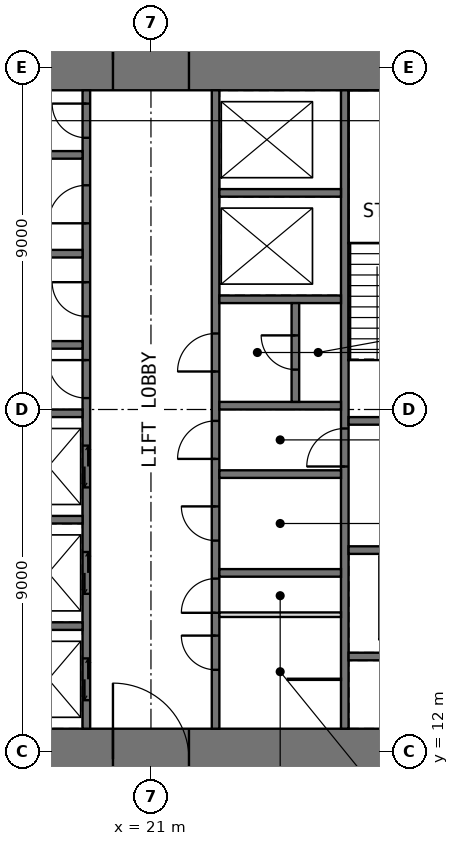
"""IFC4 building model, lengths in metres.
Left out: names, types, materials, properties, quantities, classifications, styles, units other than length and angle.
Written with IfcOpenShell. Run it as: python <this file> out.ifc"""

import sys

from ifc_helpers import new_model, si_unit, direction, frame, frame_2d, origin, place, context, subcontext, project, spatial, rectangle, extrude, element, fill, save


model = new_model("IFC4")
c1 = context("Model", 3, precision=1e-05, world=origin(), true_north=direction((0.0, 1.0)))
c2 = subcontext(c1, "Body", "Model", "MODEL_VIEW")
j1 = project(units=[si_unit("LENGTHUNIT", "METRE"), si_unit("PLANEANGLEUNIT", "RADIAN")], contexts=[c1])
p1 = place(None, origin())
s1 = spatial("IfcSite", under=j1, at=p1, CompositionType="ELEMENT")
p2 = place(p1, origin())
s2 = spatial("IfcBuilding", under=s1, at=p2, CompositionType="ELEMENT")
p3 = place(p2, frame((0.0, 0.0, 144.5)))
s3 = spatial("IfcBuildingStorey", under=s2, at=p3, CompositionType="ELEMENT", Elevation=144.5)
p4 = place(p3, frame((11.0, 11.8, -0.05), z_axis=(0.0, 0.0, 1.0), x_axis=(1.0, 0.0, 0.0)))
e1 = element("IfcWall", 1, at=p4, inside=s3, PredefinedType="SHEAR", context=c2, shape_type="SweptSolid", body=[
    extrude(rectangle(XDim=20.0, YDim=1.6, at=frame_2d((10.0, 0.0))), origin(), (0.0, 0.0, 1.0), 4.0),
])
p5 = place(p4, frame((9.0, 0.0, 0.05)))
e2 = element("IfcOpeningElement", 2, at=p5, cuts=e1, PredefinedType="OPENING", context=c2, shape_type="SweptSolid", body=[
    extrude(rectangle(XDim=2.0, YDim=2.2, at=frame_2d((1.0, 1.1))), frame((0.0, 0.81, 0.0), z_axis=(0.0, -1.0, 0.0), x_axis=(1.0, 0.0, 0.0)), (0.0, 0.0, 1.0), 1.62),
])
p6 = place(p3, frame((11.0, 30.2, -0.05), z_axis=(0.0, 0.0, 1.0), x_axis=(1.0, 0.0, 0.0)))
e3 = element("IfcWall", 3, at=p6, inside=s3, PredefinedType="SHEAR", context=c2, shape_type="SweptSolid", body=[
    extrude(rectangle(XDim=20.0, YDim=1.6, at=frame_2d((10.0, 0.0))), origin(), (0.0, 0.0, 1.0), 4.0),
])
p7 = place(p6, frame((9.0, 0.0, 0.05)))
e4 = element("IfcOpeningElement", 4, at=p7, cuts=e3, PredefinedType="OPENING", context=c2, shape_type="SweptSolid", body=[
    extrude(rectangle(XDim=2.0, YDim=2.2, at=frame_2d((1.0, 1.1))), frame((0.0, 0.81, 0.0), z_axis=(0.0, -1.0, 0.0), x_axis=(1.0, 0.0, 0.0)), (0.0, 0.0, 1.0), 1.62),
])
p8 = place(p3, frame((19.3, 12.6, -0.05), z_axis=(0.0, 0.0, 1.0), x_axis=(0.0, 1.0, 0.0)))
e5 = element("IfcWall", 5, at=p8, inside=s3, PredefinedType="SHEAR", context=c2, shape_type="SweptSolid", body=[
    extrude(rectangle(XDim=16.8, YDim=0.2, at=frame_2d((8.4, 0.0))), origin(), (0.0, 0.0, 1.0), 4.0),
])
p9 = place(p8, frame((8.7, 0.0, 0.05)))
e6 = element("IfcOpeningElement", 6, at=p9, cuts=e5, PredefinedType="OPENING", context=c2, shape_type="SweptSolid", body=[
    extrude(rectangle(XDim=1.0, YDim=2.2, at=frame_2d((0.5, 1.1))), frame((0.0, 0.11, 0.0), z_axis=(0.0, -1.0, 0.0), x_axis=(1.0, 0.0, 0.0)), (0.0, 0.0, 1.0), 0.22),
])
p10 = place(p8, frame((10.85, 0.0, 0.05)))
e7 = element("IfcOpeningElement", 7, at=p10, cuts=e5, PredefinedType="OPENING", context=c2, shape_type="SweptSolid", body=[
    extrude(rectangle(XDim=0.9, YDim=2.2, at=frame_2d((0.45, 1.1))), frame((0.0, 0.11, 0.0), z_axis=(0.0, -1.0, 0.0), x_axis=(1.0, 0.0, 0.0)), (0.0, 0.0, 1.0), 0.22),
])
p11 = place(p8, frame((13.3, 0.0, 0.05)))
e8 = element("IfcOpeningElement", 8, at=p11, cuts=e5, PredefinedType="OPENING", context=c2, shape_type="SweptSolid", body=[
    extrude(rectangle(XDim=1.0, YDim=2.2, at=frame_2d((0.5, 1.1))), frame((0.0, 0.11, 0.0), z_axis=(0.0, -1.0, 0.0), x_axis=(1.0, 0.0, 0.0)), (0.0, 0.0, 1.0), 0.22),
])
p12 = place(p8, frame((15.55, 0.0, 0.05)))
e9 = element("IfcOpeningElement", 9, at=p12, cuts=e5, PredefinedType="OPENING", context=c2, shape_type="SweptSolid", body=[
    extrude(rectangle(XDim=0.9, YDim=2.2, at=frame_2d((0.45, 1.1))), frame((0.0, 0.11, 0.0), z_axis=(0.0, -1.0, 0.0), x_axis=(1.0, 0.0, 0.0)), (0.0, 0.0, 1.0), 0.22),
])
p13 = place(p8, frame((0.75, 0.0, 0.05)))
e10 = element("IfcOpeningElement", 10, at=p13, cuts=e5, PredefinedType="OPENING", context=c2, shape_type="SweptSolid", body=[
    extrude(rectangle(XDim=1.1, YDim=2.2, at=frame_2d((0.55, 1.1))), frame((0.0, 0.11, 0.0), z_axis=(0.0, -1.0, 0.0), x_axis=(1.0, 0.0, 0.0)), (0.0, 0.0, 1.0), 0.22),
])
p14 = place(p8, frame((3.55, 0.0, 0.05)))
e11 = element("IfcOpeningElement", 11, at=p14, cuts=e5, PredefinedType="OPENING", context=c2, shape_type="SweptSolid", body=[
    extrude(rectangle(XDim=1.1, YDim=2.2, at=frame_2d((0.55, 1.1))), frame((0.0, 0.11, 0.0), z_axis=(0.0, -1.0, 0.0), x_axis=(1.0, 0.0, 0.0)), (0.0, 0.0, 1.0), 0.22),
])
p15 = place(p8, frame((6.35, 0.0, 0.05)))
e12 = element("IfcOpeningElement", 12, at=p15, cuts=e5, PredefinedType="OPENING", context=c2, shape_type="SweptSolid", body=[
    extrude(rectangle(XDim=1.1, YDim=2.2, at=frame_2d((0.55, 1.1))), frame((0.0, 0.11, 0.0), z_axis=(0.0, -1.0, 0.0), x_axis=(1.0, 0.0, 0.0)), (0.0, 0.0, 1.0), 0.22),
])
p16 = place(p3, frame((22.7, 12.6, -0.05), z_axis=(0.0, 0.0, 1.0), x_axis=(0.0, 1.0, 0.0)))
e13 = element("IfcWall", 13, at=p16, inside=s3, PredefinedType="SHEAR", context=c2, shape_type="SweptSolid", body=[
    extrude(rectangle(XDim=16.8, YDim=0.2, at=frame_2d((8.4, 0.0))), origin(), (0.0, 0.0, 1.0), 4.0),
])
p17 = place(p16, frame((3.05, 0.0, 0.05)))
e14 = element("IfcOpeningElement", 14, at=p17, cuts=e13, PredefinedType="OPENING", context=c2, shape_type="SweptSolid", body=[
    extrude(rectangle(XDim=0.9, YDim=2.2, at=frame_2d((0.45, 1.1))), frame((0.0, 0.11, 0.0), z_axis=(0.0, -1.0, 0.0), x_axis=(1.0, 0.0, 0.0)), (0.0, 0.0, 1.0), 0.22),
])
p18 = place(p16, frame((7.1, 0.0, 0.05)))
e15 = element("IfcOpeningElement", 15, at=p18, cuts=e13, PredefinedType="OPENING", context=c2, shape_type="SweptSolid", body=[
    extrude(rectangle(XDim=1.0, YDim=2.2, at=frame_2d((0.5, 1.1))), frame((0.0, 0.11, 0.0), z_axis=(0.0, -1.0, 0.0), x_axis=(1.0, 0.0, 0.0)), (0.0, 0.0, 1.0), 0.22),
])
p19 = place(p16, frame((1.55, 0.0, 0.05)))
e16 = element("IfcOpeningElement", 16, at=p19, cuts=e13, PredefinedType="OPENING", context=c2, shape_type="SweptSolid", body=[
    extrude(rectangle(XDim=0.9, YDim=2.2, at=frame_2d((0.45, 1.1))), frame((0.0, 0.11, 0.0), z_axis=(0.0, -1.0, 0.0), x_axis=(1.0, 0.0, 0.0)), (0.0, 0.0, 1.0), 0.22),
])
p20 = place(p16, frame((4.95, 0.0, 0.05)))
e17 = element("IfcOpeningElement", 17, at=p20, cuts=e13, PredefinedType="OPENING", context=c2, shape_type="SweptSolid", body=[
    extrude(rectangle(XDim=0.9, YDim=2.2, at=frame_2d((0.45, 1.1))), frame((0.0, 0.11, 0.0), z_axis=(0.0, -1.0, 0.0), x_axis=(1.0, 0.0, 0.0)), (0.0, 0.0, 1.0), 0.22),
])
p21 = place(p16, frame((9.4, 0.0, 0.05)))
e18 = element("IfcOpeningElement", 18, at=p21, cuts=e13, PredefinedType="OPENING", context=c2, shape_type="SweptSolid", body=[
    extrude(rectangle(XDim=1.0, YDim=2.2, at=frame_2d((0.5, 1.1))), frame((0.0, 0.11, 0.0), z_axis=(0.0, -1.0, 0.0), x_axis=(1.0, 0.0, 0.0)), (0.0, 0.0, 1.0), 0.22),
])
p22 = place(p3, frame((26.1, 12.6, -0.05), z_axis=(0.0, 0.0, 1.0), x_axis=(0.0, 1.0, 0.0)))
e19 = element("IfcWall", 19, at=p22, inside=s3, PredefinedType="SHEAR", context=c2, shape_type="SweptSolid", body=[
    extrude(rectangle(XDim=16.8, YDim=0.2, at=frame_2d((8.4, 0.0))), origin(), (0.0, 0.0, 1.0), 4.0),
])
p23 = place(p22, frame((6.9, 0.0, 0.05)))
e20 = element("IfcOpeningElement", 20, at=p23, cuts=e19, PredefinedType="OPENING", context=c2, shape_type="SweptSolid", body=[
    extrude(rectangle(XDim=1.0, YDim=2.2, at=frame_2d((0.5, 1.1))), frame((0.0, 0.11, 0.0), z_axis=(0.0, -1.0, 0.0), x_axis=(1.0, 0.0, 0.0)), (0.0, 0.0, 1.0), 0.22),
])
for number, where, z_axis, x_axis in (
    (21, (16.0, 15.3, -0.05), (0.0, 0.0, 1.0), (1.0, 0.0, 0.0)),
    (22, (16.0, 18.1, -0.05), (0.0, 0.0, 1.0), (1.0, 0.0, 0.0)),
    (23, (16.0, 20.9, -0.05), (0.0, 0.0, 1.0), (1.0, 0.0, 0.0)),
    (24, (16.0, 22.7, -0.05), (0.0, 0.0, 1.0), (1.0, 0.0, 0.0)),
    (25, (16.0, 25.1, -0.05), (0.0, 0.0, 1.0), (1.0, 0.0, 0.0)),
    (26, (16.0, 27.7, -0.05), (0.0, 0.0, 1.0), (1.0, 0.0, 0.0)),
    (27, (22.8, 16.7, -0.05), (0.0, 0.0, 1.0), (1.0, 0.0, 0.0)),
    (28, (22.8, 19.3, -0.05), (0.0, 0.0, 1.0), (1.0, 0.0, 0.0)),
    (29, (22.8, 21.1, -0.05), (0.0, 0.0, 1.0), (1.0, 0.0, 0.0)),
    (30, (22.8, 23.9, -0.05), (0.0, 0.0, 1.0), (1.0, 0.0, 0.0)),
    (31, (22.8, 26.7, -0.05), (0.0, 0.0, 1.0), (1.0, 0.0, 0.0)),
    (32, (26.2, 14.5, -0.05), (0.0, 0.0, 1.0), (1.0, 0.0, 0.0)),
):
    element("IfcWall", number, at=place(p3, frame(where, z_axis=z_axis, x_axis=x_axis)), inside=s3, PredefinedType="SHEAR", context=c2, shape_type="SweptSolid", body=[
        extrude(rectangle(XDim=3.2, YDim=0.2, at=frame_2d((1.6, 0.0))), origin(), (0.0, 0.0, 1.0), 4.0),
    ])
p24 = place(p3, frame((26.2, 17.3, -0.05), z_axis=(0.0, 0.0, 1.0), x_axis=(1.0, 0.0, 0.0)))
e33 = element("IfcWall", 33, at=p24, inside=s3, PredefinedType="SHEAR", context=c2, shape_type="SweptSolid", body=[
    extrude(rectangle(XDim=3.2, YDim=0.2, at=frame_2d((1.6, 0.0))), origin(), (0.0, 0.0, 1.0), 4.0),
])
p25 = place(p24, frame((1.0, 0.0, 0.05)))
e34 = element("IfcOpeningElement", 34, at=p25, cuts=e33, PredefinedType="OPENING", context=c2, shape_type="SweptSolid", body=[
    extrude(rectangle(XDim=1.2, YDim=2.2, at=frame_2d((0.6, 1.1))), frame((0.0, 0.11, 0.0), z_axis=(0.0, -1.0, 0.0), x_axis=(1.0, 0.0, 0.0)), (0.0, 0.0, 1.0), 0.22),
])
p26 = place(p3, frame((26.2, 20.7, -0.05), z_axis=(0.0, 0.0, 1.0), x_axis=(1.0, 0.0, 0.0)))
e35 = element("IfcWall", 35, at=p26, inside=s3, PredefinedType="SHEAR", context=c2, shape_type="SweptSolid", body=[
    extrude(rectangle(XDim=3.2, YDim=0.2, at=frame_2d((1.6, 0.0))), origin(), (0.0, 0.0, 1.0), 4.0),
])
p27 = place(p26, frame((1.1, 0.0, 0.05)))
e36 = element("IfcOpeningElement", 36, at=p27, cuts=e35, PredefinedType="OPENING", context=c2, shape_type="SweptSolid", body=[
    extrude(rectangle(XDim=1.0, YDim=2.2, at=frame_2d((0.5, 1.1))), frame((0.0, 0.11, 0.0), z_axis=(0.0, -1.0, 0.0), x_axis=(1.0, 0.0, 0.0)), (0.0, 0.0, 1.0), 0.22),
])
p28 = place(p3, frame((22.8, 15.6, 0.0), z_axis=(0.0, 0.0, 1.0), x_axis=(1.0, 0.0, 0.0)))
e37 = element("IfcWall", 37, at=p28, inside=s3, PredefinedType="PARTITIONING", context=c2, shape_type="SweptSolid", body=[
    extrude(rectangle(XDim=3.2, YDim=0.12, at=frame_2d((1.6, 0.0))), origin(), (0.0, 0.0, 1.0), 3.75),
])
p29 = place(p3, frame((24.6, 13.9, 0.0), z_axis=(0.0, 0.0, 1.0), x_axis=(1.0, 0.0, 0.0)))
e38 = element("IfcWall", 38, at=p29, inside=s3, PredefinedType="PARTITIONING", context=c2, shape_type="SweptSolid", body=[
    extrude(rectangle(XDim=1.4, YDim=0.03, at=frame_2d((0.7, 0.0))), origin(), (0.0, 0.0, 1.0), 3.75),
])
p30 = place(p3, frame((24.8, 21.2, -0.05), z_axis=(0.0, 0.0, 1.0), x_axis=(0.0, 1.0, 0.0)))
e39 = element("IfcWall", 39, at=p30, inside=s3, PredefinedType="SHEAR", context=c2, shape_type="SweptSolid", body=[
    extrude(rectangle(XDim=2.6, YDim=0.2, at=frame_2d((1.3, 0.0))), origin(), (0.0, 0.0, 1.0), 4.0),
])
p31 = place(p30, frame((0.85, 0.0, 0.05)))
e40 = element("IfcOpeningElement", 40, at=p31, cuts=e39, PredefinedType="OPENING", context=c2, shape_type="SweptSolid", body=[
    extrude(rectangle(XDim=0.9, YDim=2.2, at=frame_2d((0.45, 1.1))), frame((0.0, 0.11, 0.0), z_axis=(0.0, -1.0, 0.0), x_axis=(1.0, 0.0, 0.0)), (0.0, 0.0, 1.0), 0.22),
])
p32 = place(p5, origin())
e41 = element("IfcDoor", 41, at=p32, inside=s3, OperationType="DOUBLE_DOOR_SINGLE_SWING", PredefinedType="DOOR", context=c2, shape_type="SweptSolid", body=[
    extrude(rectangle(XDim=2.0, YDim=2.2, at=frame_2d((1.0, 1.1))), frame((0.0, 0.025, 0.0), z_axis=(0.0, -1.0, 0.0), x_axis=(1.0, 0.0, 0.0)), (0.0, 0.0, 1.0), 0.05),
])
fill(e2, e41)
p33 = place(p7, origin())
e42 = element("IfcDoor", 42, at=p33, inside=s3, OperationType="DOUBLE_DOOR_SINGLE_SWING", PredefinedType="DOOR", context=c2, shape_type="SweptSolid", body=[
    extrude(rectangle(XDim=2.0, YDim=2.2, at=frame_2d((1.0, 1.1))), frame((0.0, 0.025, 0.0), z_axis=(0.0, -1.0, 0.0), x_axis=(1.0, 0.0, 0.0)), (0.0, 0.0, 1.0), 0.05),
])
fill(e4, e42)
p34 = place(p17, origin())
e43 = element("IfcDoor", 43, at=p34, inside=s3, OperationType="SINGLE_SWING_LEFT", PredefinedType="DOOR", context=c2, shape_type="SweptSolid", body=[
    extrude(rectangle(XDim=0.9, YDim=2.2, at=frame_2d((0.45, 1.1))), frame((0.0, 0.025, 0.0), z_axis=(0.0, -1.0, 0.0), x_axis=(1.0, 0.0, 0.0)), (0.0, 0.0, 1.0), 0.05),
])
fill(e14, e43)
p35 = place(p23, origin())
e44 = element("IfcDoor", 44, at=p35, inside=s3, OperationType="SINGLE_SWING_LEFT", PredefinedType="DOOR", context=c2, shape_type="SweptSolid", body=[
    extrude(rectangle(XDim=1.0, YDim=2.2, at=frame_2d((0.5, 1.1))), frame((0.0, 0.025, 0.0), z_axis=(0.0, -1.0, 0.0), x_axis=(1.0, 0.0, 0.0)), (0.0, 0.0, 1.0), 0.05),
])
fill(e20, e44)
p36 = place(p9, origin())
e45 = element("IfcDoor", 45, at=p36, inside=s3, OperationType="SINGLE_SWING_RIGHT", PredefinedType="DOOR", context=c2, shape_type="SweptSolid", body=[
    extrude(rectangle(XDim=1.0, YDim=2.2, at=frame_2d((0.5, 1.1))), frame((0.0, 0.025, 0.0), z_axis=(0.0, -1.0, 0.0), x_axis=(1.0, 0.0, 0.0)), (0.0, 0.0, 1.0), 0.05),
])
fill(e6, e45)
p37 = place(p18, origin())
e46 = element("IfcDoor", 46, at=p37, inside=s3, OperationType="SINGLE_SWING_LEFT", PredefinedType="DOOR", context=c2, shape_type="SweptSolid", body=[
    extrude(rectangle(XDim=1.0, YDim=2.2, at=frame_2d((0.5, 1.1))), frame((0.0, 0.025, 0.0), z_axis=(0.0, -1.0, 0.0), x_axis=(1.0, 0.0, 0.0)), (0.0, 0.0, 1.0), 0.05),
])
fill(e15, e46)
p38 = place(p10, origin())
e47 = element("IfcDoor", 47, at=p38, inside=s3, OperationType="SINGLE_SWING_RIGHT", PredefinedType="DOOR", context=c2, shape_type="SweptSolid", body=[
    extrude(rectangle(XDim=0.9, YDim=2.2, at=frame_2d((0.45, 1.1))), frame((0.0, 0.025, 0.0), z_axis=(0.0, -1.0, 0.0), x_axis=(1.0, 0.0, 0.0)), (0.0, 0.0, 1.0), 0.05),
])
fill(e7, e47)
p39 = place(p11, origin())
e48 = element("IfcDoor", 48, at=p39, inside=s3, OperationType="SINGLE_SWING_LEFT", PredefinedType="DOOR", context=c2, shape_type="SweptSolid", body=[
    extrude(rectangle(XDim=1.0, YDim=2.2, at=frame_2d((0.5, 1.1))), frame((0.0, 0.025, 0.0), z_axis=(0.0, -1.0, 0.0), x_axis=(1.0, 0.0, 0.0)), (0.0, 0.0, 1.0), 0.05),
])
fill(e8, e48)
p40 = place(p12, origin())
e49 = element("IfcDoor", 49, at=p40, inside=s3, OperationType="SINGLE_SWING_RIGHT", PredefinedType="DOOR", context=c2, shape_type="SweptSolid", body=[
    extrude(rectangle(XDim=0.9, YDim=2.2, at=frame_2d((0.45, 1.1))), frame((0.0, 0.025, 0.0), z_axis=(0.0, -1.0, 0.0), x_axis=(1.0, 0.0, 0.0)), (0.0, 0.0, 1.0), 0.05),
])
fill(e9, e49)
p41 = place(p19, origin())
e50 = element("IfcDoor", 50, at=p41, inside=s3, OperationType="SINGLE_SWING_RIGHT", PredefinedType="DOOR", context=c2, shape_type="SweptSolid", body=[
    extrude(rectangle(XDim=0.9, YDim=2.2, at=frame_2d((0.45, 1.1))), frame((0.0, 0.025, 0.0), z_axis=(0.0, -1.0, 0.0), x_axis=(1.0, 0.0, 0.0)), (0.0, 0.0, 1.0), 0.05),
])
fill(e16, e50)
p42 = place(p20, origin())
e51 = element("IfcDoor", 51, at=p42, inside=s3, OperationType="SINGLE_SWING_RIGHT", PredefinedType="DOOR", context=c2, shape_type="SweptSolid", body=[
    extrude(rectangle(XDim=0.9, YDim=2.2, at=frame_2d((0.45, 1.1))), frame((0.0, 0.025, 0.0), z_axis=(0.0, -1.0, 0.0), x_axis=(1.0, 0.0, 0.0)), (0.0, 0.0, 1.0), 0.05),
])
fill(e17, e51)
p43 = place(p21, origin())
e52 = element("IfcDoor", 52, at=p43, inside=s3, OperationType="SINGLE_SWING_LEFT", PredefinedType="DOOR", context=c2, shape_type="SweptSolid", body=[
    extrude(rectangle(XDim=1.0, YDim=2.2, at=frame_2d((0.5, 1.1))), frame((0.0, 0.025, 0.0), z_axis=(0.0, -1.0, 0.0), x_axis=(1.0, 0.0, 0.0)), (0.0, 0.0, 1.0), 0.05),
])
fill(e18, e52)
p44 = place(p31, origin())
e53 = element("IfcDoor", 53, at=p44, inside=s3, OperationType="SINGLE_SWING_RIGHT", PredefinedType="DOOR", context=c2, shape_type="SweptSolid", body=[
    extrude(rectangle(XDim=0.9, YDim=2.2, at=frame_2d((0.45, 1.1))), frame((0.0, 0.025, 0.0), z_axis=(0.0, -1.0, 0.0), x_axis=(1.0, 0.0, 0.0)), (0.0, 0.0, 1.0), 0.05),
])
fill(e40, e53)
p45 = place(p13, origin())
e54 = element("IfcDoor", 54, at=p45, inside=s3, OperationType="DOUBLE_DOOR_SLIDING", PredefinedType="DOOR", context=c2, shape_type="SweptSolid", body=[
    extrude(rectangle(XDim=1.1, YDim=2.2, at=frame_2d((0.55, 1.1))), frame((0.0, 0.025, 0.0), z_axis=(0.0, -1.0, 0.0), x_axis=(1.0, 0.0, 0.0)), (0.0, 0.0, 1.0), 0.05),
])
fill(e10, e54)
p46 = place(p14, origin())
e55 = element("IfcDoor", 55, at=p46, inside=s3, OperationType="DOUBLE_DOOR_SLIDING", PredefinedType="DOOR", context=c2, shape_type="SweptSolid", body=[
    extrude(rectangle(XDim=1.1, YDim=2.2, at=frame_2d((0.55, 1.1))), frame((0.0, 0.025, 0.0), z_axis=(0.0, -1.0, 0.0), x_axis=(1.0, 0.0, 0.0)), (0.0, 0.0, 1.0), 0.05),
])
fill(e11, e55)
p47 = place(p15, origin())
e56 = element("IfcDoor", 56, at=p47, inside=s3, OperationType="DOUBLE_DOOR_SLIDING", PredefinedType="DOOR", context=c2, shape_type="SweptSolid", body=[
    extrude(rectangle(XDim=1.1, YDim=2.2, at=frame_2d((0.55, 1.1))), frame((0.0, 0.025, 0.0), z_axis=(0.0, -1.0, 0.0), x_axis=(1.0, 0.0, 0.0)), (0.0, 0.0, 1.0), 0.05),
])
fill(e12, e56)
save(model, sys.argv[1])
